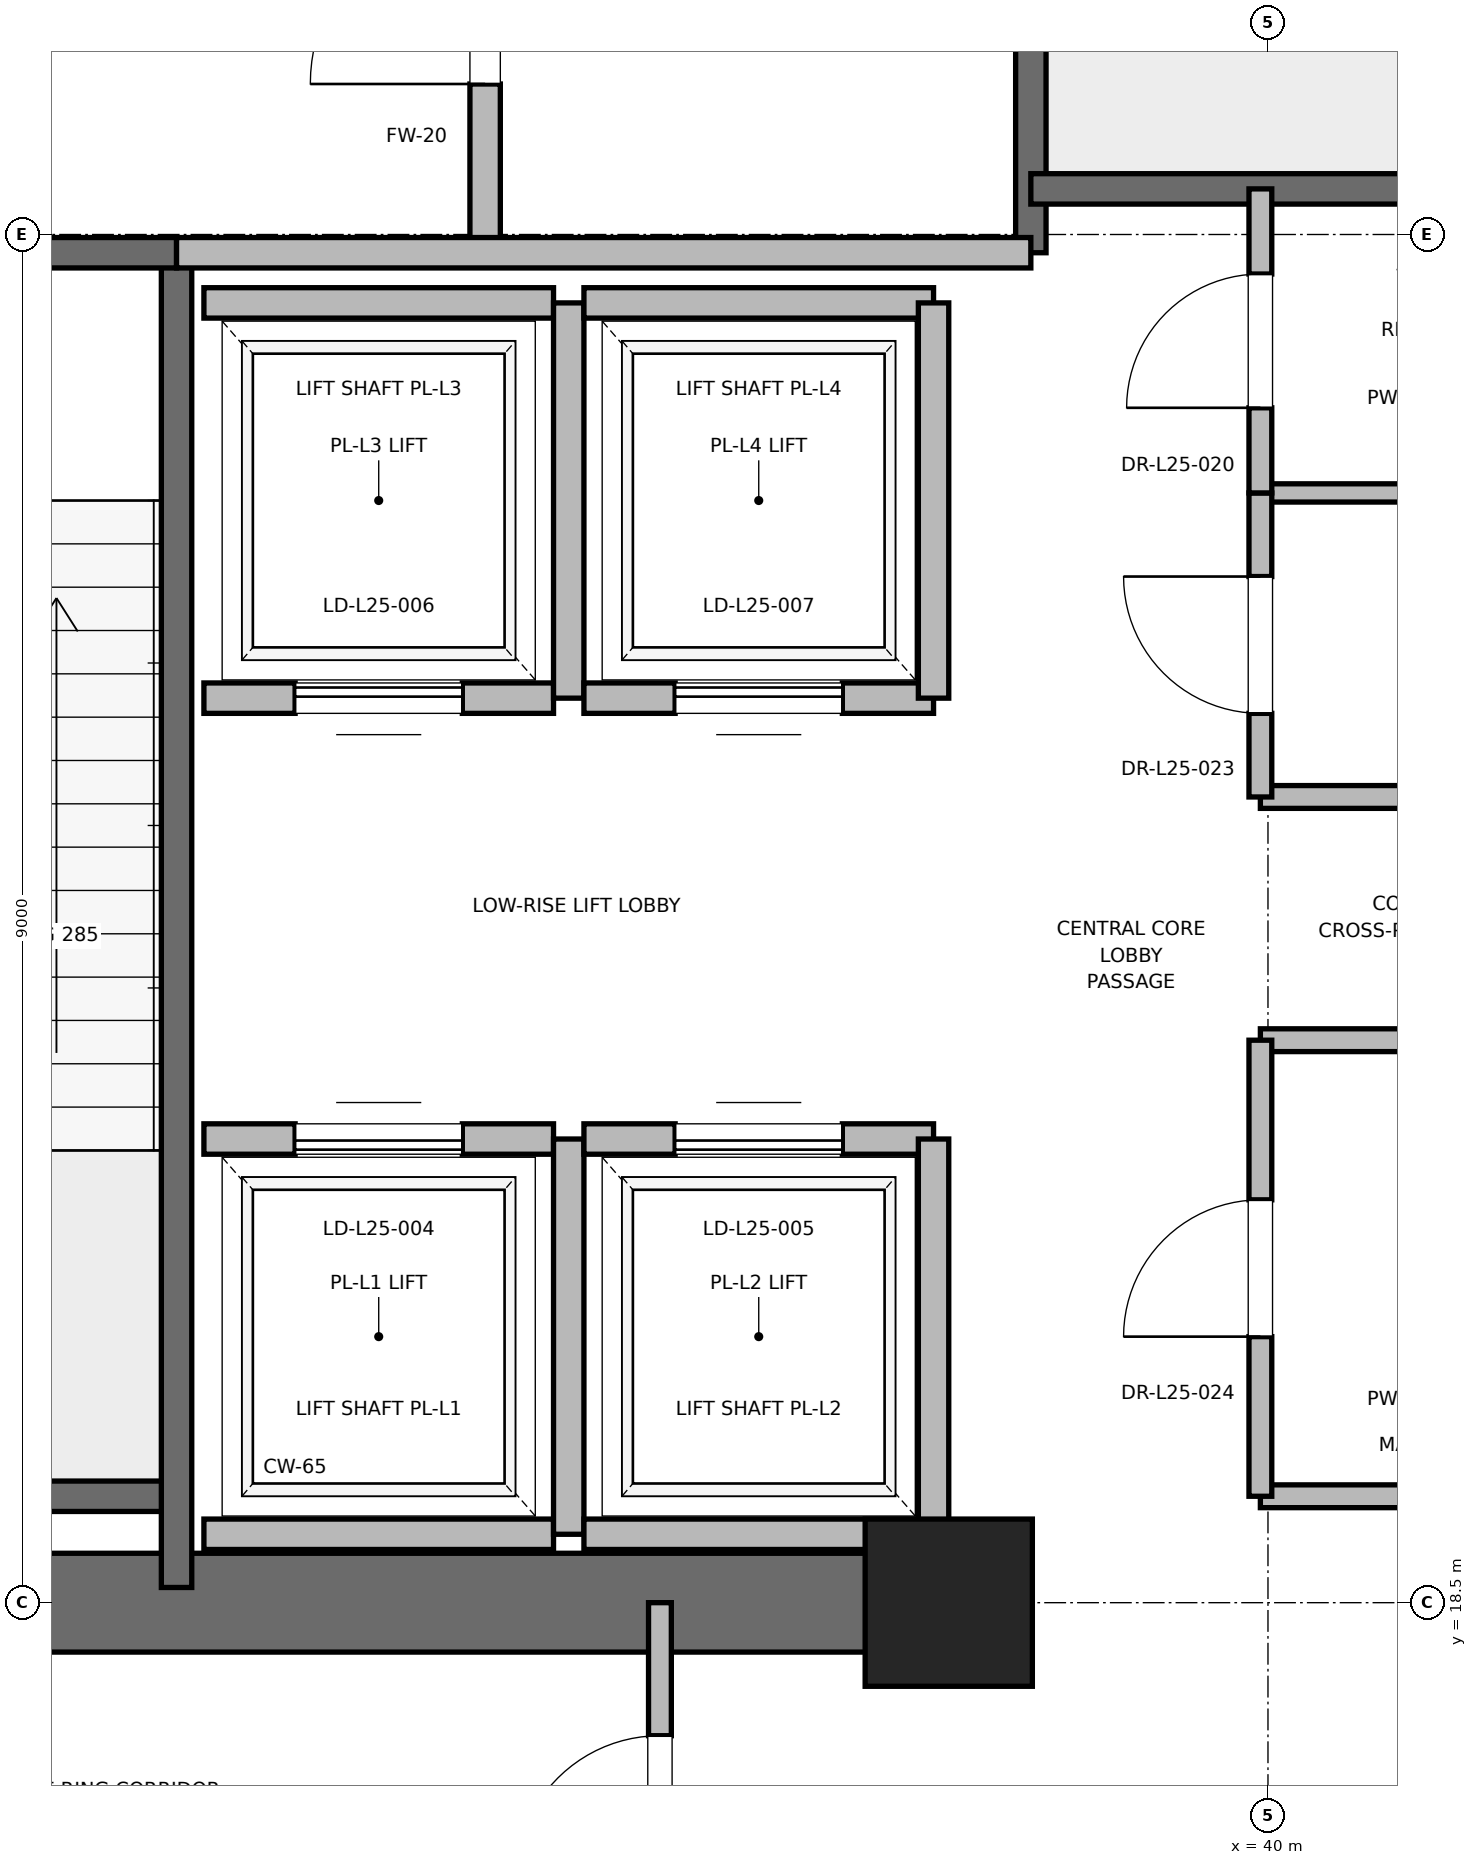
"""IFC4 building model, lengths in metres.
Left out: names, types, materials, properties, quantities, classifications, styles, units other than length and angle.
Written with IfcOpenShell. Run it as: python <this file> out.ifc"""

import sys

from ifc_helpers import new_model, si_unit, direction, frame, frame_2d, origin, origin_2d, place, context, subcontext, project, spatial, rectangle, extrude, element, fill, save


model = new_model("IFC4")
c1 = context("Model", 3, precision=1e-05, world=origin(), true_north=direction((0.0, 1.0)))
c2 = subcontext(c1, "Body", "Model", "MODEL_VIEW")
j1 = project(units=[si_unit("LENGTHUNIT", "METRE"), si_unit("PLANEANGLEUNIT", "RADIAN")], contexts=[c1])
p1 = place(None, origin())
s1 = spatial("IfcSite", under=j1, at=p1, CompositionType="ELEMENT")
p2 = place(p1, origin())
s2 = spatial("IfcBuilding", under=s1, at=p2, CompositionType="ELEMENT")
p3 = place(p2, frame((0.0, 0.0, 107.6)))
s3 = spatial("IfcBuildingStorey", under=s2, at=p3, CompositionType="ELEMENT", Elevation=107.6)
p4 = place(p3, frame((37.9, 18.5, 0.0), z_axis=(0.0, 0.0, 1.0), x_axis=(1.0, 0.0, 0.0)))
e1 = element("IfcColumn", 1, at=p4, inside=s3, PredefinedType="PILASTER", context=c2, shape_type="SweptSolid", body=[
    extrude(rectangle(XDim=1.1, YDim=1.1, at=origin_2d()), origin(), (0.0, 0.0, 1.0), 5.4),
])
p5 = place(p3, frame((29.0, 18.5, 0.0), z_axis=(0.0, 0.0, 1.0), x_axis=(1.0, 0.0, 0.0)))
e2 = element("IfcWall", 2, at=p5, inside=s3, PredefinedType="SHEAR", context=c2, shape_type="SweptSolid", body=[
    extrude(rectangle(XDim=9.2, YDim=0.65, at=frame_2d((4.6, 0.0))), origin(), (0.0, 0.0, 1.0), 5.1),
])
p6 = place(p3, frame((29.7, 19.2, 0.0), z_axis=(0.0, 0.0, 1.0), x_axis=(1.0, 0.0, 0.0)))
e3 = element("IfcWall", 3, at=p6, inside=s3, PredefinedType="SOLIDWALL", context=c2, shape_type="SweptSolid", body=[
    extrude(rectangle(XDim=3.12, YDim=0.2, at=frame_2d((1.56, 0.0))), origin(), (0.0, 0.0, 1.0), 5.1),
])
p7 = place(p3, frame((32.82, 18.6, 0.0), z_axis=(0.0, 0.0, 1.0), x_axis=(0.0, 1.0, 0.0)))
e4 = element("IfcWall", 4, at=p7, inside=s3, PredefinedType="SOLIDWALL", context=c2, shape_type="SweptSolid", body=[
    extrude(rectangle(XDim=8.78, YDim=0.2, at=frame_2d((4.39, 0.0))), origin(), (0.0, 0.0, 1.0), 5.1),
])
p8 = place(p3, frame((29.7, 27.38, 0.0), z_axis=(0.0, 0.0, 1.0), x_axis=(1.0, 0.0, 0.0)))
e5 = element("IfcWall", 5, at=p8, inside=s3, PredefinedType="SOLIDWALL", context=c2, shape_type="SweptSolid", body=[
    extrude(rectangle(XDim=3.12, YDim=0.2, at=frame_2d((1.56, 0.0))), origin(), (0.0, 0.0, 1.0), 5.1),
])
p9 = place(p8, frame((1.01, 0.0, 0.0)))
e6 = element("IfcOpeningElement", 6, at=p9, cuts=e5, PredefinedType="OPENING", context=c2, shape_type="SweptSolid", body=[
    extrude(rectangle(XDim=1.1, YDim=2.15, at=frame_2d((0.55, 1.075))), frame((0.0, 0.1, 0.0), z_axis=(0.0, -1.0, 0.0), x_axis=(1.0, 0.0, 0.0)), (0.0, 0.0, 1.0), 0.2),
])
p10 = place(p3, frame((38.44, 27.38, 0.0), z_axis=(0.0, 0.0, 1.0), x_axis=(0.0, 1.0, 0.0)))
e7 = element("IfcWall", 7, at=p10, inside=s3, PredefinedType="SOLIDWALL", context=c2, shape_type="SweptSolid", body=[
    extrude(rectangle(XDim=8.87, YDim=0.2, at=frame_2d((4.435, 0.0))), origin(), (0.0, 0.0, 1.0), 5.1),
])
p11 = place(p3, frame((38.44, 27.8, 0.0), z_axis=(0.0, 0.0, 1.0), x_axis=(1.0, 0.0, 0.0)))
e8 = element("IfcWall", 8, at=p11, inside=s3, PredefinedType="SOLIDWALL", context=c2, shape_type="SweptSolid", body=[
    extrude(rectangle(XDim=3.32, YDim=0.2, at=frame_2d((1.66, 0.0))), origin(), (0.0, 0.0, 1.0), 5.1),
])
p12 = place(p3, frame((34.85, 27.38, 0.0), z_axis=(0.0, 0.0, 1.0), x_axis=(0.0, 1.0, 0.0)))
e9 = element("IfcWall", 9, at=p12, inside=s3, PredefinedType="PARTITIONING", context=c2, shape_type="SweptSolid", body=[
    extrude(rectangle(XDim=3.37, YDim=0.2, at=frame_2d((1.685, 0.0))), origin(), (0.0, 0.0, 1.0), 5.1),
])
p13 = place(p12, frame((1.11, 0.0, 0.0)))
e10 = element("IfcOpeningElement", 10, at=p13, cuts=e9, PredefinedType="OPENING", context=c2, shape_type="SweptSolid", body=[
    extrude(rectangle(XDim=1.15, YDim=2.2, at=frame_2d((0.575, 1.1))), frame((0.0, 0.1, 0.0), z_axis=(0.0, -1.0, 0.0), x_axis=(1.0, 0.0, 0.0)), (0.0, 0.0, 1.0), 0.2),
])
p14 = place(p3, frame((32.82, 27.38, 0.0), z_axis=(0.0, 0.0, 1.0), x_axis=(1.0, 0.0, 0.0)))
e11 = element("IfcWall", 11, at=p14, inside=s3, PredefinedType="PARTITIONING", context=c2, shape_type="SweptSolid", body=[
    extrude(rectangle(XDim=5.62, YDim=0.2, at=frame_2d((2.81, 0.0))), origin(), (0.0, 0.0, 1.0), 5.1),
])
p15 = place(p3, frame((33.0, 18.95, 0.0), z_axis=(0.0, 0.0, 1.0), x_axis=(1.0, 0.0, 0.0)))
e12 = element("IfcWall", 12, at=p15, inside=s3, PredefinedType="SOLIDWALL", context=c2, shape_type="SweptSolid", body=[
    extrude(rectangle(XDim=2.3, YDim=0.2, at=frame_2d((1.15, 0.0))), origin(), (0.0, 0.0, 1.0), 5.1),
])
p16 = place(p3, frame((35.3, 21.55, 0.0), z_axis=(0.0, 0.0, 1.0), x_axis=(-1.0, 0.0, 0.0)))
e13 = element("IfcWall", 13, at=p16, inside=s3, PredefinedType="SOLIDWALL", context=c2, shape_type="SweptSolid", body=[
    extrude(rectangle(XDim=2.3, YDim=0.2, at=frame_2d((1.15, 0.0))), origin(), (0.0, 0.0, 1.0), 5.1),
])
p17 = place(p16, frame((0.6, 0.0, 0.0)))
e14 = element("IfcOpeningElement", 14, at=p17, cuts=e13, PredefinedType="OPENING", context=c2, shape_type="SweptSolid", body=[
    extrude(rectangle(XDim=1.1, YDim=2.2, at=frame_2d((0.55, 1.1))), frame((0.0, 0.1, 0.0), z_axis=(0.0, -1.0, 0.0), x_axis=(1.0, 0.0, 0.0)), (0.0, 0.0, 1.0), 0.2),
])
p18 = place(p3, frame((35.4, 18.95, 0.0), z_axis=(0.0, 0.0, 1.0), x_axis=(0.0, 1.0, 0.0)))
e15 = element("IfcWall", 15, at=p18, inside=s3, PredefinedType="SOLIDWALL", context=c2, shape_type="SweptSolid", body=[
    extrude(rectangle(XDim=2.6, YDim=0.2, at=frame_2d((1.3, 0.0))), origin(), (0.0, 0.0, 1.0), 5.1),
])
p19 = place(p3, frame((35.5, 18.95, 0.0), z_axis=(0.0, 0.0, 1.0), x_axis=(1.0, 0.0, 0.0)))
e16 = element("IfcWall", 16, at=p19, inside=s3, PredefinedType="SOLIDWALL", context=c2, shape_type="SweptSolid", body=[
    extrude(rectangle(XDim=2.3, YDim=0.2, at=frame_2d((1.15, 0.0))), origin(), (0.0, 0.0, 1.0), 3.88),
])
p20 = place(p3, frame((37.8, 21.55, 0.0), z_axis=(0.0, 0.0, 1.0), x_axis=(-1.0, 0.0, 0.0)))
e17 = element("IfcWall", 17, at=p20, inside=s3, PredefinedType="SOLIDWALL", context=c2, shape_type="SweptSolid", body=[
    extrude(rectangle(XDim=2.3, YDim=0.2, at=frame_2d((1.15, 0.0))), origin(), (0.0, 0.0, 1.0), 5.1),
])
p21 = place(p20, frame((0.6, 0.0, 0.0)))
e18 = element("IfcOpeningElement", 18, at=p21, cuts=e17, PredefinedType="OPENING", context=c2, shape_type="SweptSolid", body=[
    extrude(rectangle(XDim=1.1, YDim=2.2, at=frame_2d((0.55, 1.1))), frame((0.0, 0.1, 0.0), z_axis=(0.0, -1.0, 0.0), x_axis=(1.0, 0.0, 0.0)), (0.0, 0.0, 1.0), 0.2),
])
p22 = place(p3, frame((37.8, 18.95, 0.0), z_axis=(0.0, 0.0, 1.0), x_axis=(0.0, 1.0, 0.0)))
e19 = element("IfcWall", 19, at=p22, inside=s3, PredefinedType="SOLIDWALL", context=c2, shape_type="SweptSolid", body=[
    extrude(rectangle(XDim=2.6, YDim=0.2, at=frame_2d((1.3, 0.0))), origin(), (0.0, 0.0, 1.0), 3.88),
])
p23 = place(p3, frame((33.0, 24.45, 0.0), z_axis=(0.0, 0.0, 1.0), x_axis=(1.0, 0.0, 0.0)))
e20 = element("IfcWall", 20, at=p23, inside=s3, PredefinedType="SOLIDWALL", context=c2, shape_type="SweptSolid", body=[
    extrude(rectangle(XDim=2.3, YDim=0.2, at=frame_2d((1.15, 0.0))), origin(), (0.0, 0.0, 1.0), 5.1),
])
p24 = place(p23, frame((0.6, 0.0, 0.0)))
e21 = element("IfcOpeningElement", 21, at=p24, cuts=e20, PredefinedType="OPENING", context=c2, shape_type="SweptSolid", body=[
    extrude(rectangle(XDim=1.1, YDim=2.2, at=frame_2d((0.55, 1.1))), frame((0.0, 0.1, 0.0), z_axis=(0.0, -1.0, 0.0), x_axis=(1.0, 0.0, 0.0)), (0.0, 0.0, 1.0), 0.2),
])
p25 = place(p3, frame((35.3, 27.05, 0.0), z_axis=(0.0, 0.0, 1.0), x_axis=(-1.0, 0.0, 0.0)))
e22 = element("IfcWall", 22, at=p25, inside=s3, PredefinedType="SOLIDWALL", context=c2, shape_type="SweptSolid", body=[
    extrude(rectangle(XDim=2.3, YDim=0.2, at=frame_2d((1.15, 0.0))), origin(), (0.0, 0.0, 1.0), 5.1),
])
p26 = place(p3, frame((35.4, 24.45, 0.0), z_axis=(0.0, 0.0, 1.0), x_axis=(0.0, 1.0, 0.0)))
e23 = element("IfcWall", 23, at=p26, inside=s3, PredefinedType="SOLIDWALL", context=c2, shape_type="SweptSolid", body=[
    extrude(rectangle(XDim=2.6, YDim=0.2, at=frame_2d((1.3, 0.0))), origin(), (0.0, 0.0, 1.0), 5.1),
])
p27 = place(p3, frame((35.5, 24.45, 0.0), z_axis=(0.0, 0.0, 1.0), x_axis=(1.0, 0.0, 0.0)))
e24 = element("IfcWall", 24, at=p27, inside=s3, PredefinedType="SOLIDWALL", context=c2, shape_type="SweptSolid", body=[
    extrude(rectangle(XDim=2.3, YDim=0.2, at=frame_2d((1.15, 0.0))), origin(), (0.0, 0.0, 1.0), 5.1),
])
p28 = place(p27, frame((0.6, 0.0, 0.0)))
e25 = element("IfcOpeningElement", 25, at=p28, cuts=e24, PredefinedType="OPENING", context=c2, shape_type="SweptSolid", body=[
    extrude(rectangle(XDim=1.1, YDim=2.2, at=frame_2d((0.55, 1.1))), frame((0.0, 0.1, 0.0), z_axis=(0.0, -1.0, 0.0), x_axis=(1.0, 0.0, 0.0)), (0.0, 0.0, 1.0), 0.2),
])
p29 = place(p3, frame((37.8, 27.05, 0.0), z_axis=(0.0, 0.0, 1.0), x_axis=(-1.0, 0.0, 0.0)))
e26 = element("IfcWall", 26, at=p29, inside=s3, PredefinedType="SOLIDWALL", context=c2, shape_type="SweptSolid", body=[
    extrude(rectangle(XDim=2.3, YDim=0.2, at=frame_2d((1.15, 0.0))), origin(), (0.0, 0.0, 1.0), 5.1),
])
p30 = place(p3, frame((37.8, 24.45, 0.0), z_axis=(0.0, 0.0, 1.0), x_axis=(0.0, 1.0, 0.0)))
e27 = element("IfcWall", 27, at=p30, inside=s3, PredefinedType="SOLIDWALL", context=c2, shape_type="SweptSolid", body=[
    extrude(rectangle(XDim=2.6, YDim=0.2, at=frame_2d((1.3, 0.0))), origin(), (0.0, 0.0, 1.0), 5.1),
])
for number, where, z_axis, x_axis in (
    (28, (39.95, 19.2, 0.0), (0.0, 0.0, 1.0), (1.0, 0.0, 0.0)),
    (29, (39.95, 22.2, 0.0), (0.0, 0.0, 1.0), (1.0, 0.0, 0.0)),
    (30, (39.95, 23.8, 0.0), (0.0, 0.0, 1.0), (1.0, 0.0, 0.0)),
):
    element("IfcWall", number, at=place(p3, frame(where, z_axis=z_axis, x_axis=x_axis)), inside=s3, PredefinedType="PARTITIONING", context=c2, shape_type="SweptSolid", body=[
        extrude(rectangle(XDim=1.81, YDim=0.15, at=frame_2d((0.905, 0.0))), origin(), (0.0, 0.0, 1.0), 2.85),
    ])
p31 = place(p3, frame((39.95, 25.8, 0.0), z_axis=(0.0, 0.0, 1.0), x_axis=(1.0, 0.0, 0.0)))
e31 = element("IfcWall", 31, at=p31, inside=s3, PredefinedType="PARTITIONING", context=c2, shape_type="SweptSolid", body=[
    extrude(rectangle(XDim=1.81, YDim=0.12, at=frame_2d((0.905, 0.0))), origin(), (0.0, 0.0, 1.0), 2.85),
])
p32 = place(p3, frame((39.95, 19.2, 0.0), z_axis=(0.0, 0.0, 1.0), x_axis=(0.0, 1.0, 0.0)))
e32 = element("IfcWall", 32, at=p32, inside=s3, PredefinedType="PARTITIONING", context=c2, shape_type="SweptSolid", body=[
    extrude(rectangle(XDim=3.0, YDim=0.15, at=frame_2d((1.5, 0.0))), origin(), (0.0, 0.0, 1.0), 2.85),
])
p33 = place(p32, frame((1.05, 0.0, 0.0)))
e33 = element("IfcOpeningElement", 33, at=p33, cuts=e32, PredefinedType="OPENING", context=c2, shape_type="SweptSolid", body=[
    extrude(rectangle(XDim=0.9, YDim=2.1, at=frame_2d((0.45, 1.05))), frame((0.0, 0.075, 0.0), z_axis=(0.0, -1.0, 0.0), x_axis=(1.0, 0.0, 0.0)), (0.0, 0.0, 1.0), 0.15),
])
p34 = place(p3, frame((39.95, 23.8, 0.0), z_axis=(0.0, 0.0, 1.0), x_axis=(0.0, 1.0, 0.0)))
e34 = element("IfcWall", 34, at=p34, inside=s3, PredefinedType="PARTITIONING", context=c2, shape_type="SweptSolid", body=[
    extrude(rectangle(XDim=2.0, YDim=0.15, at=frame_2d((1.0, 0.0))), origin(), (0.0, 0.0, 1.0), 2.85),
])
p35 = place(p34, frame((0.55, 0.0, 0.0)))
e35 = element("IfcOpeningElement", 35, at=p35, cuts=e34, PredefinedType="OPENING", context=c2, shape_type="SweptSolid", body=[
    extrude(rectangle(XDim=0.9, YDim=2.1, at=frame_2d((0.45, 1.05))), frame((0.0, 0.075, 0.0), z_axis=(0.0, -1.0, 0.0), x_axis=(1.0, 0.0, 0.0)), (0.0, 0.0, 1.0), 0.15),
])
p36 = place(p3, frame((39.95, 25.8, 0.0), z_axis=(0.0, 0.0, 1.0), x_axis=(0.0, 1.0, 0.0)))
e36 = element("IfcWall", 36, at=p36, inside=s3, PredefinedType="PARTITIONING", context=c2, shape_type="SweptSolid", body=[
    extrude(rectangle(XDim=2.0, YDim=0.15, at=frame_2d((1.0, 0.0))), origin(), (0.0, 0.0, 1.0), 2.85),
])
p37 = place(p36, frame((0.56, 0.0, 0.0)))
e37 = element("IfcOpeningElement", 37, at=p37, cuts=e36, PredefinedType="OPENING", context=c2, shape_type="SweptSolid", body=[
    extrude(rectangle(XDim=0.88, YDim=2.1, at=frame_2d((0.44, 1.05))), frame((0.0, 0.075, 0.0), z_axis=(0.0, -1.0, 0.0), x_axis=(1.0, 0.0, 0.0)), (0.0, 0.0, 1.0), 0.15),
])
p38 = place(p3, frame((36.0, 15.8, 0.0), z_axis=(0.0, 0.0, 1.0), x_axis=(0.0, 1.0, 0.0)))
e38 = element("IfcWall", 38, at=p38, inside=s3, PredefinedType="PARTITIONING", context=c2, shape_type="SweptSolid", body=[
    extrude(rectangle(XDim=2.7, YDim=0.15, at=frame_2d((1.35, 0.0))), origin(), (0.0, 0.0, 1.0), 2.85),
])
p39 = place(p38, frame((0.875, 0.0, 0.0)))
e39 = element("IfcOpeningElement", 39, at=p39, cuts=e38, PredefinedType="OPENING", context=c2, shape_type="SweptSolid", body=[
    extrude(rectangle(XDim=0.95, YDim=2.15, at=frame_2d((0.475, 1.075))), frame((0.0, 0.075, 0.0), z_axis=(0.0, -1.0, 0.0), x_axis=(1.0, 0.0, 0.0)), (0.0, 0.0, 1.0), 0.15),
])
p40 = place(p13, origin())
e40 = element("IfcDoor", 40, at=p40, inside=s3, OperationType="SINGLE_SWING_LEFT", PredefinedType="DOOR", context=c2, shape_type="SweptSolid", body=[
    extrude(rectangle(XDim=1.15, YDim=2.2, at=frame_2d((0.575, 1.1))), frame((0.0, 0.025, 0.0), z_axis=(0.0, -1.0, 0.0), x_axis=(1.0, 0.0, 0.0)), (0.0, 0.0, 1.0), 0.05),
])
fill(e10, e40)
p41 = place(p17, origin())
e41 = element("IfcDoor", 41, at=p41, inside=s3, OperationType="SLIDING_TO_RIGHT", PredefinedType="DOOR", context=c2, shape_type="SweptSolid", body=[
    extrude(rectangle(XDim=1.1, YDim=2.2, at=frame_2d((0.55, 1.1))), frame((0.0, 0.025, 0.0), z_axis=(0.0, -1.0, 0.0), x_axis=(1.0, 0.0, 0.0)), (0.0, 0.0, 1.0), 0.05),
])
fill(e14, e41)
p42 = place(p21, origin())
e42 = element("IfcDoor", 42, at=p42, inside=s3, OperationType="SLIDING_TO_RIGHT", PredefinedType="DOOR", context=c2, shape_type="SweptSolid", body=[
    extrude(rectangle(XDim=1.1, YDim=2.2, at=frame_2d((0.55, 1.1))), frame((0.0, 0.025, 0.0), z_axis=(0.0, -1.0, 0.0), x_axis=(1.0, 0.0, 0.0)), (0.0, 0.0, 1.0), 0.05),
])
fill(e18, e42)
p43 = place(p24, origin())
e43 = element("IfcDoor", 43, at=p43, inside=s3, OperationType="SLIDING_TO_RIGHT", PredefinedType="DOOR", context=c2, shape_type="SweptSolid", body=[
    extrude(rectangle(XDim=1.1, YDim=2.2, at=frame_2d((0.55, 1.1))), frame((0.0, 0.025, 0.0), z_axis=(0.0, -1.0, 0.0), x_axis=(1.0, 0.0, 0.0)), (0.0, 0.0, 1.0), 0.05),
])
fill(e21, e43)
p44 = place(p28, origin())
e44 = element("IfcDoor", 44, at=p44, inside=s3, OperationType="SLIDING_TO_RIGHT", PredefinedType="DOOR", context=c2, shape_type="SweptSolid", body=[
    extrude(rectangle(XDim=1.1, YDim=2.2, at=frame_2d((0.55, 1.1))), frame((0.0, 0.025, 0.0), z_axis=(0.0, -1.0, 0.0), x_axis=(1.0, 0.0, 0.0)), (0.0, 0.0, 1.0), 0.05),
])
fill(e25, e44)
p45 = place(p33, origin())
e45 = element("IfcDoor", 45, at=p45, inside=s3, OperationType="SINGLE_SWING_LEFT", PredefinedType="DOOR", context=c2, shape_type="SweptSolid", body=[
    extrude(rectangle(XDim=0.9, YDim=2.1, at=frame_2d((0.45, 1.05))), frame((0.0, 0.025, 0.0), z_axis=(0.0, -1.0, 0.0), x_axis=(1.0, 0.0, 0.0)), (0.0, 0.0, 1.0), 0.05),
])
fill(e33, e45)
p46 = place(p35, origin())
e46 = element("IfcDoor", 46, at=p46, inside=s3, OperationType="SINGLE_SWING_RIGHT", PredefinedType="DOOR", context=c2, shape_type="SweptSolid", body=[
    extrude(rectangle(XDim=0.9, YDim=2.1, at=frame_2d((0.45, 1.05))), frame((0.0, 0.025, 0.0), z_axis=(0.0, -1.0, 0.0), x_axis=(1.0, 0.0, 0.0)), (0.0, 0.0, 1.0), 0.05),
])
fill(e35, e46)
p47 = place(p37, origin())
e47 = element("IfcDoor", 47, at=p47, inside=s3, OperationType="SINGLE_SWING_LEFT", PredefinedType="DOOR", context=c2, shape_type="SweptSolid", body=[
    extrude(rectangle(XDim=0.88, YDim=2.1, at=frame_2d((0.44, 1.05))), frame((0.0, 0.025, 0.0), z_axis=(0.0, -1.0, 0.0), x_axis=(1.0, 0.0, 0.0)), (0.0, 0.0, 1.0), 0.05),
])
fill(e37, e47)
p48 = place(p39, origin())
e48 = element("IfcDoor", 48, at=p48, inside=s3, OperationType="SINGLE_SWING_LEFT", PredefinedType="DOOR", context=c2, shape_type="SweptSolid", body=[
    extrude(rectangle(XDim=0.95, YDim=2.15, at=frame_2d((0.475, 1.075))), frame((0.0, 0.025, 0.0), z_axis=(0.0, -1.0, 0.0), x_axis=(1.0, 0.0, 0.0)), (0.0, 0.0, 1.0), 0.05),
])
fill(e39, e48)
save(model, sys.argv[1])
